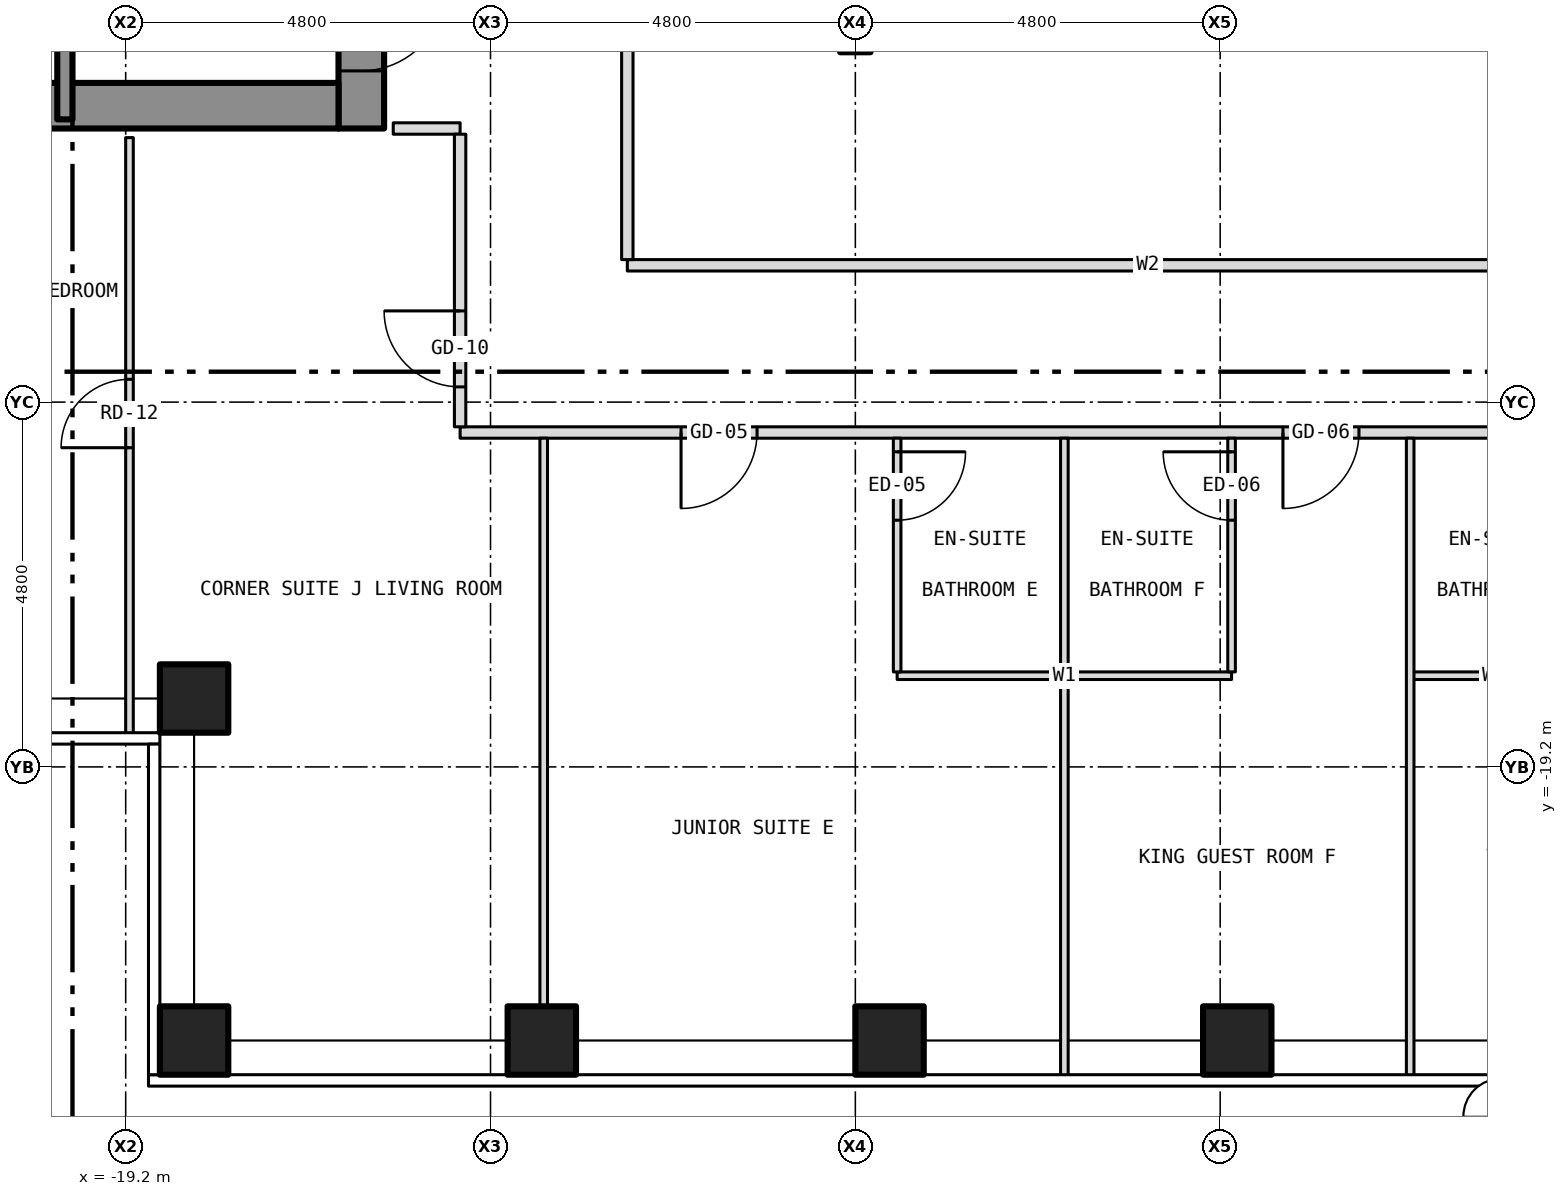
"""IFC4 building model, lengths in metres.
Left out: names, types, materials, properties, quantities, classifications, styles, units other than length and angle.
Written with IfcOpenShell. Run it as: python <this file> out.ifc"""

import sys

from ifc_helpers import new_model, si_unit, direction, frame, frame_2d, origin, origin_2d, place, context, subcontext, project, spatial, rectangle, hollow_rectangle, extrude, element, fill, save


model = new_model("IFC4")
c1 = context("Model", 3, precision=1e-05, world=origin(), true_north=direction((0.0, 1.0)))
c2 = subcontext(c1, "Body", "Model", "MODEL_VIEW")
j1 = project(units=[si_unit("LENGTHUNIT", "METRE"), si_unit("PLANEANGLEUNIT", "RADIAN")], contexts=[c1])
p1 = place(None, origin())
s1 = spatial("IfcSite", under=j1, at=p1, CompositionType="ELEMENT")
p2 = place(p1, origin())
s2 = spatial("IfcBuilding", under=s1, at=p2, CompositionType="ELEMENT")
p3 = place(p2, frame((0.0, 0.0, 96.0)))
s3 = spatial("IfcBuildingStorey", under=s2, at=p3, CompositionType="ELEMENT", Elevation=96.0)
for number, where, z_axis, x_axis in (
    (1, (-18.3, -22.8, -0.15), (0.0, 0.0, 1.0), (1.0, 0.0, 0.0)),
    (2, (-13.725, -22.8, -0.15), (0.0, 0.0, 1.0), (1.0, 0.0, 0.0)),
    (3, (-9.15, -22.8, -0.15), (0.0, 0.0, 1.0), (1.0, 0.0, 0.0)),
    (4, (-4.575, -22.8, -0.15), (0.0, 0.0, 1.0), (1.0, 0.0, 0.0)),
    (5, (-18.3, -18.3, -0.15), (0.0, 0.0, 1.0), (1.0, 0.0, 0.0)),
):
    element("IfcColumn", number, at=place(p3, frame(where, z_axis=z_axis, x_axis=x_axis)), inside=s3, PredefinedType="COLUMN", context=c2, shape_type="SweptSolid", body=[
        extrude(hollow_rectangle(XDim=0.9, YDim=0.9, WallThickness=0.05, at=origin_2d()), origin(), (0.0, 0.0, 1.0), 3.5),
    ])
p4 = place(p3, frame((-16.1, -10.8, 0.0), z_axis=(0.0, 0.0, 1.0), x_axis=(0.0, 1.0, 0.0)))
e6 = element("IfcWall", 6, at=p4, inside=s3, PredefinedType="SHEAR", context=c2, shape_type="SweptSolid", body=[
    extrude(rectangle(XDim=21.6, YDim=0.6, at=frame_2d((10.8, 0.0))), origin(), (0.0, 0.0, 1.0), 3.25),
])
p5 = place(p4, frame((9.4, 0.0, 0.0)))
e7 = element("IfcOpeningElement", 7, at=p5, cuts=e6, PredefinedType="OPENING", context=c2, shape_type="SweptSolid", body=[
    extrude(rectangle(XDim=1.1, YDim=2.1, at=frame_2d((0.55, 1.05))), frame((0.0, 0.312, 0.0), z_axis=(0.0, -1.0, 0.0), x_axis=(1.0, 0.0, 0.0)), (0.0, 0.0, 1.0), 0.624),
])
p6 = place(p4, frame((11.5, 0.0, 0.0)))
e8 = element("IfcOpeningElement", 8, at=p6, cuts=e6, PredefinedType="OPENING", context=c2, shape_type="SweptSolid", body=[
    extrude(rectangle(XDim=1.1, YDim=2.1, at=frame_2d((0.55, 1.05))), frame((0.0, 0.312, 0.0), z_axis=(0.0, -1.0, 0.0), x_axis=(1.0, 0.0, 0.0)), (0.0, 0.0, 1.0), 0.624),
])
p7 = place(p4, frame((13.6, 0.0, 0.0)))
e9 = element("IfcOpeningElement", 9, at=p7, cuts=e6, PredefinedType="OPENING", context=c2, shape_type="SweptSolid", body=[
    extrude(rectangle(XDim=1.1, YDim=2.1, at=frame_2d((0.55, 1.05))), frame((0.0, 0.312, 0.0), z_axis=(0.0, -1.0, 0.0), x_axis=(1.0, 0.0, 0.0)), (0.0, 0.0, 1.0), 0.624),
])
p8 = place(p4, frame((15.7, 0.0, 0.0)))
e10 = element("IfcOpeningElement", 10, at=p8, cuts=e6, PredefinedType="OPENING", context=c2, shape_type="SweptSolid", body=[
    extrude(rectangle(XDim=1.1, YDim=2.1, at=frame_2d((0.55, 1.05))), frame((0.0, 0.312, 0.0), z_axis=(0.0, -1.0, 0.0), x_axis=(1.0, 0.0, 0.0)), (0.0, 0.0, 1.0), 0.624),
])
p9 = place(p4, frame((17.8, 0.0, 0.0)))
e11 = element("IfcOpeningElement", 11, at=p9, cuts=e6, PredefinedType="OPENING", context=c2, shape_type="SweptSolid", body=[
    extrude(rectangle(XDim=1.1, YDim=2.1, at=frame_2d((0.55, 1.05))), frame((0.0, 0.312, 0.0), z_axis=(0.0, -1.0, 0.0), x_axis=(1.0, 0.0, 0.0)), (0.0, 0.0, 1.0), 0.624),
])
p10 = place(p4, frame((0.758, 0.0, 0.0)))
e12 = element("IfcOpeningElement", 12, at=p10, cuts=e6, PredefinedType="OPENING", context=c2, shape_type="SweptSolid", body=[
    extrude(rectangle(XDim=1.1, YDim=2.1, at=frame_2d((0.55, 1.05))), frame((0.0, 0.312, 0.0), z_axis=(0.0, -1.0, 0.0), x_axis=(1.0, 0.0, 0.0)), (0.0, 0.0, 1.0), 0.624),
])
p11 = place(p4, frame((7.5, 0.0, 0.0)))
e13 = element("IfcOpeningElement", 13, at=p11, cuts=e6, PredefinedType="OPENING", context=c2, shape_type="SweptSolid", body=[
    extrude(rectangle(XDim=1.1, YDim=2.1, at=frame_2d((0.55, 1.05))), frame((0.0, 0.312, 0.0), z_axis=(0.0, -1.0, 0.0), x_axis=(1.0, 0.0, 0.0)), (0.0, 0.0, 1.0), 0.624),
])
p12 = place(p3, frame((-22.2, -10.5, 0.0), z_axis=(0.0, 0.0, 1.0), x_axis=(1.0, 0.0, 0.0)))
e14 = element("IfcWall", 14, at=p12, inside=s3, PredefinedType="SHEAR", context=c2, shape_type="SweptSolid", body=[
    extrude(rectangle(XDim=5.8, YDim=0.6, at=frame_2d((2.9, 0.0))), origin(), (0.0, 0.0, 1.0), 3.25),
])
p13 = place(p3, frame((-9.05, -18.0, 0.0), z_axis=(0.0, 0.0, 1.0), x_axis=(1.0, 0.0, 0.0)))
e15 = element("IfcWall", 15, at=p13, inside=s3, PredefinedType="PARTITIONING", context=c2, shape_type="SweptSolid", body=[
    extrude(rectangle(XDim=4.4, YDim=0.1, at=frame_2d((2.2, 0.0))), origin(), (0.0, 0.0, 1.0), 3.35),
])
p14 = place(p3, frame((-2.3, -18.0, 0.0), z_axis=(0.0, 0.0, 1.0), x_axis=(1.0, 0.0, 0.0)))
e16 = element("IfcWall", 16, at=p14, inside=s3, PredefinedType="PARTITIONING", context=c2, shape_type="SweptSolid", body=[
    extrude(rectangle(XDim=2.2, YDim=0.1, at=frame_2d((1.1, 0.0))), origin(), (0.0, 0.0, 1.0), 3.35),
])
p15 = place(p3, frame((-14.8, -14.8, 0.0), z_axis=(0.0, 0.0, 1.0), x_axis=(1.0, 0.0, 0.0)))
e17 = element("IfcWall", 17, at=p15, inside=s3, PredefinedType="PARTITIONING", context=c2, shape_type="SweptSolid", body=[
    extrude(rectangle(XDim=29.6, YDim=0.15, at=frame_2d((14.8, 0.0))), origin(), (0.0, 0.0, 1.0), 3.35),
])
p16 = place(p15, frame((2.907, 0.0, 0.0)))
e18 = element("IfcOpeningElement", 18, at=p16, cuts=e17, PredefinedType="OPENING", context=c2, shape_type="SweptSolid", body=[
    extrude(rectangle(XDim=1.0, YDim=2.1, at=frame_2d((0.5, 1.05))), frame((0.0, 0.087, 0.0), z_axis=(0.0, -1.0, 0.0), x_axis=(1.0, 0.0, 0.0)), (0.0, 0.0, 1.0), 0.174),
])
p17 = place(p15, frame((10.826, 0.0, 0.0)))
e19 = element("IfcOpeningElement", 19, at=p17, cuts=e17, PredefinedType="OPENING", context=c2, shape_type="SweptSolid", body=[
    extrude(rectangle(XDim=1.0, YDim=2.1, at=frame_2d((0.5, 1.05))), frame((0.0, 0.087, 0.0), z_axis=(0.0, -1.0, 0.0), x_axis=(1.0, 0.0, 0.0)), (0.0, 0.0, 1.0), 0.174),
])
p18 = place(p15, frame((15.401, 0.0, 0.0)))
e20 = element("IfcOpeningElement", 20, at=p18, cuts=e17, PredefinedType="OPENING", context=c2, shape_type="SweptSolid", body=[
    extrude(rectangle(XDim=1.0, YDim=2.1, at=frame_2d((0.5, 1.05))), frame((0.0, 0.087, 0.0), z_axis=(0.0, -1.0, 0.0), x_axis=(1.0, 0.0, 0.0)), (0.0, 0.0, 1.0), 0.174),
])
p19 = place(p15, frame((18.919, 0.0, 0.0)))
e21 = element("IfcOpeningElement", 21, at=p19, cuts=e17, PredefinedType="OPENING", context=c2, shape_type="SweptSolid", body=[
    extrude(rectangle(XDim=1.0, YDim=2.1, at=frame_2d((0.5, 1.05))), frame((0.0, 0.087, 0.0), z_axis=(0.0, -1.0, 0.0), x_axis=(1.0, 0.0, 0.0)), (0.0, 0.0, 1.0), 0.174),
])
p20 = place(p15, frame((24.638, 0.0, 0.0)))
e22 = element("IfcOpeningElement", 22, at=p20, cuts=e17, PredefinedType="OPENING", context=c2, shape_type="SweptSolid", body=[
    extrude(rectangle(XDim=1.0, YDim=2.1, at=frame_2d((0.5, 1.05))), frame((0.0, 0.087, 0.0), z_axis=(0.0, -1.0, 0.0), x_axis=(1.0, 0.0, 0.0)), (0.0, 0.0, 1.0), 0.174),
])
p21 = place(p3, frame((-12.6, -12.6, 0.0), z_axis=(0.0, 0.0, 1.0), x_axis=(1.0, 0.0, 0.0)))
e23 = element("IfcWall", 23, at=p21, inside=s3, PredefinedType="PARTITIONING", context=c2, shape_type="SweptSolid", body=[
    extrude(rectangle(XDim=13.7, YDim=0.15, at=frame_2d((6.85, 0.0))), origin(), (0.0, 0.0, 1.0), 3.35),
])
p22 = place(p3, frame((-15.68, -10.8, 0.0), z_axis=(0.0, 0.0, 1.0), x_axis=(1.0, 0.0, 0.0)))
e24 = element("IfcWall", 24, at=p22, inside=s3, PredefinedType="PARTITIONING", context=c2, shape_type="SweptSolid", body=[
    extrude(rectangle(XDim=0.88, YDim=0.15, at=frame_2d((0.44, 0.0))), origin(), (0.0, 0.0, 1.0), 3.35),
])
p23 = place(p3, frame((-20.0, -10.68, 0.0), z_axis=(0.0, 0.0, 1.0), x_axis=(0.0, 1.0, 0.0)))
e25 = element("IfcWall", 25, at=p23, inside=s3, PredefinedType="SHEAR", context=c2, shape_type="SweptSolid", body=[
    extrude(rectangle(XDim=6.98, YDim=0.2, at=frame_2d((3.49, 0.0))), origin(), (0.0, 0.0, 1.0), 3.25),
])
p24 = place(p3, frame((-19.15, -18.78, 0.0), z_axis=(0.0, 0.0, 1.0), x_axis=(0.0, 1.0, 0.0)))
e26 = element("IfcWall", 26, at=p24, inside=s3, PredefinedType="PARTITIONING", context=c2, shape_type="SweptSolid", body=[
    extrude(rectangle(XDim=7.86, YDim=0.1, at=frame_2d((3.93, 0.0))), origin(), (0.0, 0.0, 1.0), 2.817),
])
p25 = place(p24, frame((3.78, 0.0, 0.0)))
e27 = element("IfcOpeningElement", 27, at=p25, cuts=e26, PredefinedType="OPENING", context=c2, shape_type="SweptSolid", body=[
    extrude(rectangle(XDim=0.9, YDim=2.1, at=frame_2d((0.45, 1.05))), frame((0.0, 0.062, 0.0), z_axis=(0.0, -1.0, 0.0), x_axis=(1.0, 0.0, 0.0)), (0.0, 0.0, 1.0), 0.124),
])
p26 = place(p3, frame((-14.8, -14.725, 0.0), z_axis=(0.0, 0.0, 1.0), x_axis=(0.0, 1.0, 0.0)))
e28 = element("IfcWall", 28, at=p26, inside=s3, PredefinedType="PARTITIONING", context=c2, shape_type="SweptSolid", body=[
    extrude(rectangle(XDim=3.85, YDim=0.15, at=frame_2d((1.925, 0.0))), origin(), (0.0, 0.0, 1.0), 3.35),
])
p27 = place(p26, frame((0.525, 0.0, 0.0)))
e29 = element("IfcOpeningElement", 29, at=p27, cuts=e28, PredefinedType="OPENING", context=c2, shape_type="SweptSolid", body=[
    extrude(rectangle(XDim=1.0, YDim=2.1, at=frame_2d((0.5, 1.05))), frame((0.0, 0.087, 0.0), z_axis=(0.0, -1.0, 0.0), x_axis=(1.0, 0.0, 0.0)), (0.0, 0.0, 1.0), 0.174),
])
p28 = place(p3, frame((-13.7, -22.68, 0.0), z_axis=(0.0, 0.0, 1.0), x_axis=(0.0, 1.0, 0.0)))
e30 = element("IfcWall", 30, at=p28, inside=s3, PredefinedType="PARTITIONING", context=c2, shape_type="SweptSolid", body=[
    extrude(rectangle(XDim=7.805, YDim=0.1, at=frame_2d((3.902, 0.0))), origin(), (0.0, 0.0, 1.0), 3.35),
])
p29 = place(p3, frame((-12.6, -12.525, 0.0), z_axis=(0.0, 0.0, 1.0), x_axis=(0.0, 1.0, 0.0)))
e31 = element("IfcWall", 31, at=p29, inside=s3, PredefinedType="PARTITIONING", context=c2, shape_type="SweptSolid", body=[
    extrude(rectangle(XDim=10.525, YDim=0.15, at=frame_2d((5.262, 0.0))), origin(), (0.0, 0.0, 1.0), 3.35),
])
p30 = place(p3, frame((-9.05, -17.95, 0.0), z_axis=(0.0, 0.0, 1.0), x_axis=(0.0, 1.0, 0.0)))
e32 = element("IfcWall", 32, at=p30, inside=s3, PredefinedType="PARTITIONING", context=c2, shape_type="SweptSolid", body=[
    extrude(rectangle(XDim=3.075, YDim=0.1, at=frame_2d((1.538, 0.0))), origin(), (0.0, 0.0, 1.0), 3.35),
])
p31 = place(p30, frame((1.996, 0.0, 0.0)))
e33 = element("IfcOpeningElement", 33, at=p31, cuts=e32, PredefinedType="OPENING", context=c2, shape_type="SweptSolid", body=[
    extrude(rectangle(XDim=0.9, YDim=2.1, at=frame_2d((0.45, 1.05))), frame((0.0, 0.062, 0.0), z_axis=(0.0, -1.0, 0.0), x_axis=(1.0, 0.0, 0.0)), (0.0, 0.0, 1.0), 0.124),
])
p32 = place(p3, frame((-6.85, -23.28, 0.0), z_axis=(0.0, 0.0, 1.0), x_axis=(0.0, 1.0, 0.0)))
e34 = element("IfcWall", 34, at=p32, inside=s3, PredefinedType="PARTITIONING", context=c2, shape_type="SweptSolid", body=[
    extrude(rectangle(XDim=5.23, YDim=0.1, at=frame_2d((2.615, 0.0))), origin(), (0.0, 0.0, 1.0), 3.35),
])
p33 = place(p3, frame((-6.85, -17.95, 0.0), z_axis=(0.0, 0.0, 1.0), x_axis=(0.0, 1.0, 0.0)))
e35 = element("IfcWall", 35, at=p33, inside=s3, PredefinedType="PARTITIONING", context=c2, shape_type="SweptSolid", body=[
    extrude(rectangle(XDim=3.075, YDim=0.1, at=frame_2d((1.538, 0.0))), origin(), (0.0, 0.0, 1.0), 3.35),
])
p34 = place(p3, frame((-4.65, -17.95, 0.0), z_axis=(0.0, 0.0, 1.0), x_axis=(0.0, 1.0, 0.0)))
e36 = element("IfcWall", 36, at=p34, inside=s3, PredefinedType="PARTITIONING", context=c2, shape_type="SweptSolid", body=[
    extrude(rectangle(XDim=3.075, YDim=0.1, at=frame_2d((1.538, 0.0))), origin(), (0.0, 0.0, 1.0), 2.817),
])
p35 = place(p34, frame((1.996, 0.0, 0.0)))
e37 = element("IfcOpeningElement", 37, at=p35, cuts=e36, PredefinedType="OPENING", context=c2, shape_type="SweptSolid", body=[
    extrude(rectangle(XDim=0.9, YDim=2.1, at=frame_2d((0.45, 1.05))), frame((0.0, 0.062, 0.0), z_axis=(0.0, -1.0, 0.0), x_axis=(1.0, 0.0, 0.0)), (0.0, 0.0, 1.0), 0.124),
])
p36 = place(p3, frame((-2.3, -23.28, 0.0), z_axis=(0.0, 0.0, 1.0), x_axis=(0.0, 1.0, 0.0)))
e38 = element("IfcWall", 38, at=p36, inside=s3, PredefinedType="PARTITIONING", context=c2, shape_type="SweptSolid", body=[
    extrude(rectangle(XDim=8.405, YDim=0.1, at=frame_2d((4.203, 0.0))), origin(), (0.0, 0.0, 1.0), 3.35),
])
p37 = place(p10, origin())
e39 = element("IfcDoor", 39, at=p37, inside=s3, OperationType="SINGLE_SWING_RIGHT", PredefinedType="DOOR", context=c2, shape_type="SweptSolid", body=[
    extrude(rectangle(XDim=1.1, YDim=2.1, at=frame_2d((0.55, 1.05))), frame((0.0, 0.025, 0.0), z_axis=(0.0, -1.0, 0.0), x_axis=(1.0, 0.0, 0.0)), (0.0, 0.0, 1.0), 0.05),
])
fill(e12, e39)
p38 = place(p16, origin())
e40 = element("IfcDoor", 40, at=p38, inside=s3, OperationType="SINGLE_SWING_LEFT", PredefinedType="DOOR", context=c2, shape_type="SweptSolid", body=[
    extrude(rectangle(XDim=1.0, YDim=2.1, at=frame_2d((0.5, 1.05))), frame((0.0, 0.025, 0.0), z_axis=(0.0, -1.0, 0.0), x_axis=(1.0, 0.0, 0.0)), (0.0, 0.0, 1.0), 0.05),
])
fill(e18, e40)
p39 = place(p31, origin())
e41 = element("IfcDoor", 41, at=p39, inside=s3, OperationType="SINGLE_SWING_RIGHT", PredefinedType="DOOR", context=c2, shape_type="SweptSolid", body=[
    extrude(rectangle(XDim=0.9, YDim=2.1, at=frame_2d((0.45, 1.05))), frame((0.0, 0.025, 0.0), z_axis=(0.0, -1.0, 0.0), x_axis=(1.0, 0.0, 0.0)), (0.0, 0.0, 1.0), 0.05),
])
fill(e33, e41)
p40 = place(p17, origin())
e42 = element("IfcDoor", 42, at=p40, inside=s3, OperationType="SINGLE_SWING_LEFT", PredefinedType="DOOR", context=c2, shape_type="SweptSolid", body=[
    extrude(rectangle(XDim=1.0, YDim=2.1, at=frame_2d((0.5, 1.05))), frame((0.0, 0.025, 0.0), z_axis=(0.0, -1.0, 0.0), x_axis=(1.0, 0.0, 0.0)), (0.0, 0.0, 1.0), 0.05),
])
fill(e19, e42)
p41 = place(p35, origin())
e43 = element("IfcDoor", 43, at=p41, inside=s3, OperationType="SINGLE_SWING_RIGHT", PredefinedType="DOOR", context=c2, shape_type="SweptSolid", body=[
    extrude(rectangle(XDim=0.9, YDim=2.1, at=frame_2d((0.45, 1.05))), frame((0.0, 0.025, 0.0), z_axis=(0.0, -1.0, 0.0), x_axis=(1.0, 0.0, 0.0)), (0.0, 0.0, 1.0), 0.05),
])
fill(e37, e43)
p42 = place(p27, origin())
e44 = element("IfcDoor", 44, at=p42, inside=s3, OperationType="SINGLE_SWING_RIGHT", PredefinedType="DOOR", context=c2, shape_type="SweptSolid", body=[
    extrude(rectangle(XDim=1.0, YDim=2.1, at=frame_2d((0.5, 1.05))), frame((0.0, 0.025, 0.0), z_axis=(0.0, -1.0, 0.0), x_axis=(1.0, 0.0, 0.0)), (0.0, 0.0, 1.0), 0.05),
])
fill(e29, e44)
p43 = place(p25, origin())
e45 = element("IfcDoor", 45, at=p43, inside=s3, OperationType="SINGLE_SWING_LEFT", PredefinedType="DOOR", context=c2, shape_type="SweptSolid", body=[
    extrude(rectangle(XDim=0.9, YDim=2.1, at=frame_2d((0.45, 1.05))), frame((0.0, 0.025, 0.0), z_axis=(0.0, -1.0, 0.0), x_axis=(1.0, 0.0, 0.0)), (0.0, 0.0, 1.0), 0.05),
])
fill(e27, e45)
save(model, sys.argv[1])
